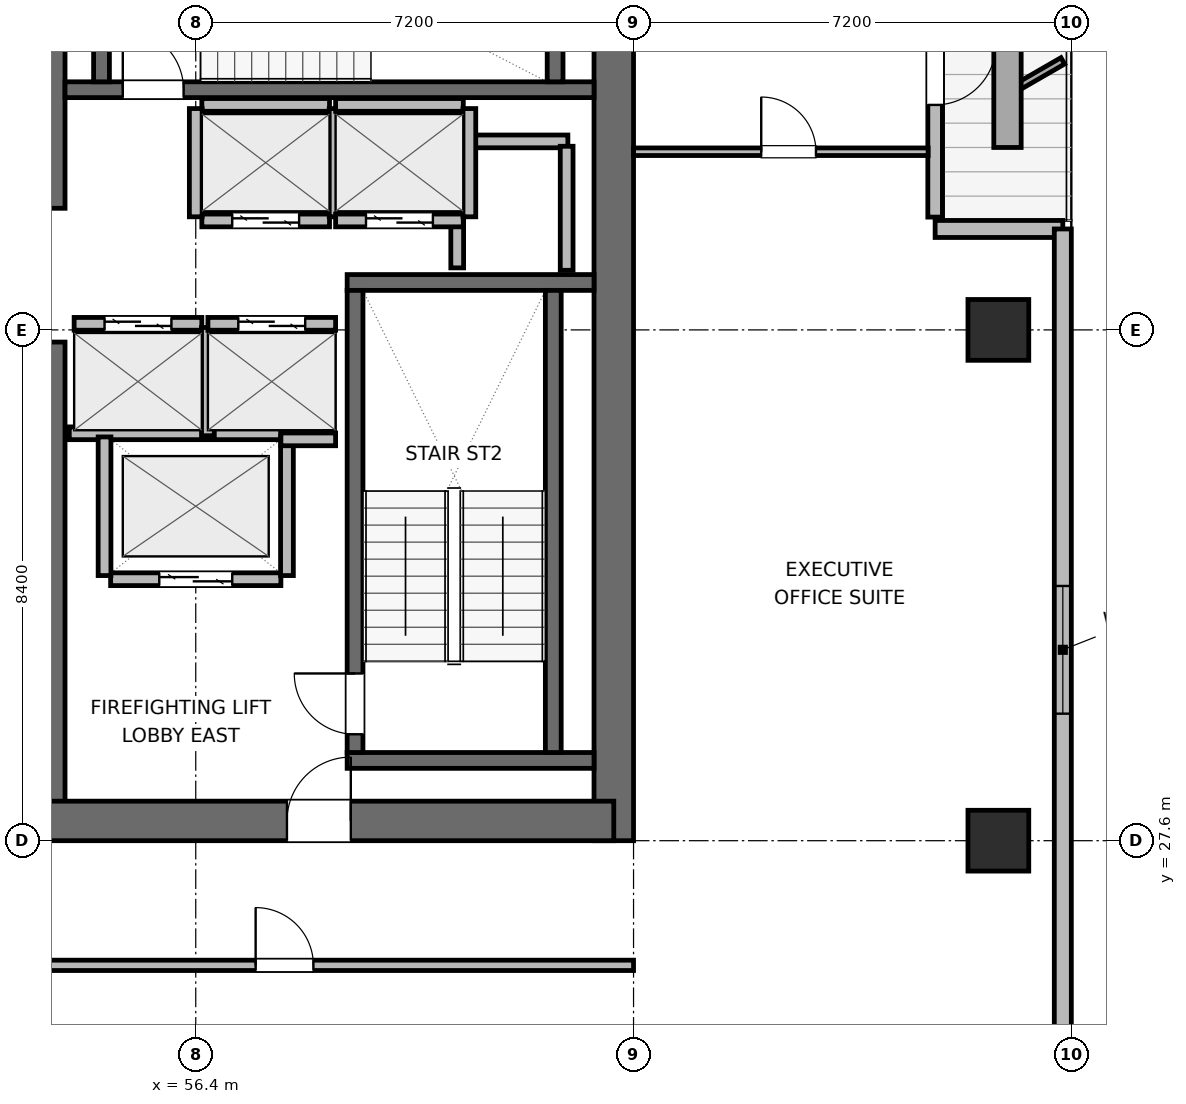
"""IFC4 building model, lengths in metres.
Left out: names, types, materials, properties, quantities, classifications, styles, units other than length and angle.
Written with IfcOpenShell. Run it as: python <this file> out.ifc"""

import sys

from ifc_helpers import new_model, si_unit, direction, frame, frame_2d, origin, origin_2d, place, context, subcontext, project, spatial, rectangle, extrude, element, fill, save


model = new_model("IFC4")
c1 = context("Model", 3, precision=1e-05, world=origin(), true_north=direction((0.0, 1.0)))
c2 = subcontext(c1, "Body", "Model", "MODEL_VIEW")
j1 = project(units=[si_unit("LENGTHUNIT", "METRE"), si_unit("PLANEANGLEUNIT", "RADIAN")], contexts=[c1])
p1 = place(None, origin())
s1 = spatial("IfcSite", under=j1, at=p1, CompositionType="ELEMENT")
p2 = place(p1, origin())
s2 = spatial("IfcBuilding", under=s1, at=p2, CompositionType="ELEMENT")
p3 = place(p2, frame((0.0, 0.0, 231.0)))
s3 = spatial("IfcBuildingStorey", under=s2, at=p3, CompositionType="ELEMENT", Elevation=231.0)
p4 = place(p3, frame((53.925, 27.925, 0.0), z_axis=(0.0, 0.0, 1.0), x_axis=(0.0, 1.0, 0.0)))
e1 = element("IfcWall", 1, at=p4, inside=s3, PredefinedType="SHEAR", context=c2, shape_type="SweptSolid", body=[
    extrude(rectangle(XDim=7.875, YDim=0.65, at=frame_2d((3.938, 0.0))), origin(), (0.0, 0.0, 1.0), 3.9),
])
p5 = place(p3, frame((53.925, 38.0, 0.0), z_axis=(0.0, 0.0, 1.0), x_axis=(0.0, 1.0, 0.0)))
e2 = element("IfcWall", 2, at=p5, inside=s3, PredefinedType="SHEAR", context=c2, shape_type="SweptSolid", body=[
    extrude(rectangle(XDim=6.075, YDim=0.65, at=frame_2d((3.038, 0.0))), origin(), (0.0, 0.0, 1.0), 3.9),
])
p6 = place(p3, frame((63.275, 27.6, 0.0), z_axis=(0.0, 0.0, 1.0), x_axis=(0.0, 1.0, 0.0)))
e3 = element("IfcWall", 3, at=p6, inside=s3, PredefinedType="SHEAR", context=c2, shape_type="SweptSolid", body=[
    extrude(rectangle(XDim=16.8, YDim=0.65, at=frame_2d((8.4, 0.0))), origin(), (0.0, 0.0, 1.0), 3.9),
])
p7 = place(p3, frame((53.925, 27.925, 0.0), z_axis=(0.0, 0.0, 1.0), x_axis=(1.0, 0.0, 0.0)))
e4 = element("IfcWall", 4, at=p7, inside=s3, PredefinedType="SHEAR", context=c2, shape_type="SweptSolid", body=[
    extrude(rectangle(XDim=9.35, YDim=0.65, at=frame_2d((4.675, 0.0))), origin(), (0.0, 0.0, 1.0), 3.9),
])
p8 = place(p7, frame((3.975, 0.0, 0.0)))
e5 = element("IfcOpeningElement", 5, at=p8, cuts=e4, PredefinedType="OPENING", context=c2, shape_type="SweptSolid", body=[
    extrude(rectangle(XDim=1.05, YDim=2.04, at=frame_2d((0.525, 1.02))), frame((0.0, 0.335, 0.0), z_axis=(0.0, -1.0, 0.0), x_axis=(1.0, 0.0, 0.0)), (0.0, 0.0, 1.0), 0.67),
])
for number, where, z_axis, x_axis in (
    (6, (58.89, 28.92, 0.0), (0.0, 0.0, 1.0), (1.0, 0.0, 0.0)),
    (7, (58.89, 36.78, 0.0), (0.0, 0.0, 1.0), (1.0, 0.0, 0.0)),
):
    element("IfcWall", number, at=place(p3, frame(where, z_axis=z_axis, x_axis=x_axis)), inside=s3, PredefinedType="SHEAR", context=c2, shape_type="SweptSolid", body=[
        extrude(rectangle(XDim=4.06, YDim=0.26, at=frame_2d((2.03, 0.0))), origin(), (0.0, 0.0, 1.0), 3.9),
    ])
p9 = place(p3, frame((59.02, 29.05, 0.0), z_axis=(0.0, 0.0, 1.0), x_axis=(0.0, 1.0, 0.0)))
e8 = element("IfcWall", 8, at=p9, inside=s3, PredefinedType="SHEAR", context=c2, shape_type="SweptSolid", body=[
    extrude(rectangle(XDim=7.6, YDim=0.26, at=frame_2d((3.8, 0.0))), origin(), (0.0, 0.0, 1.0), 3.9),
])
p10 = place(p9, frame((0.3, 0.0, 0.0)))
e9 = element("IfcOpeningElement", 9, at=p10, cuts=e8, PredefinedType="OPENING", context=c2, shape_type="SweptSolid", body=[
    extrude(rectangle(XDim=1.0, YDim=2.04, at=frame_2d((0.5, 1.02))), frame((0.0, 0.14, 0.0), z_axis=(0.0, -1.0, 0.0), x_axis=(1.0, 0.0, 0.0)), (0.0, 0.0, 1.0), 0.28),
])
p11 = place(p3, frame((62.28, 29.05, 0.0), z_axis=(0.0, 0.0, 1.0), x_axis=(0.0, 1.0, 0.0)))
e10 = element("IfcWall", 10, at=p11, inside=s3, PredefinedType="SHEAR", context=c2, shape_type="SweptSolid", body=[
    extrude(rectangle(XDim=7.6, YDim=0.26, at=frame_2d((3.8, 0.0))), origin(), (0.0, 0.0, 1.0), 3.9),
])
p12 = place(p3, frame((54.25, 39.95, 0.0), z_axis=(0.0, 0.0, 1.0), x_axis=(1.0, 0.0, 0.0)))
e11 = element("IfcWall", 11, at=p12, inside=s3, PredefinedType="SHEAR", context=c2, shape_type="SweptSolid", body=[
    extrude(rectangle(XDim=8.7, YDim=0.26, at=frame_2d((4.35, 0.0))), origin(), (0.0, 0.0, 1.0), 3.9),
])
p13 = place(p12, frame((0.95, 0.0, 0.0)))
e12 = element("IfcOpeningElement", 12, at=p13, cuts=e11, PredefinedType="OPENING", context=c2, shape_type="SweptSolid", body=[
    extrude(rectangle(XDim=1.0, YDim=2.04, at=frame_2d((0.5, 1.02))), frame((0.0, 0.14, 0.0), z_axis=(0.0, -1.0, 0.0), x_axis=(1.0, 0.0, 0.0)), (0.0, 0.0, 1.0), 0.28),
])
for number, where, z_axis, x_axis in (
    (13, (54.85, 40.08, 0.0), (0.0, 0.0, 1.0), (0.0, 1.0, 0.0)),
    (14, (62.31, 40.08, 0.0), (0.0, 0.0, 1.0), (0.0, 1.0, 0.0)),
):
    element("IfcWall", number, at=place(p3, frame(where, z_axis=z_axis, x_axis=x_axis)), inside=s3, PredefinedType="SHEAR", context=c2, shape_type="SweptSolid", body=[
        extrude(rectangle(XDim=2.94, YDim=0.26, at=frame_2d((1.47, 0.0))), origin(), (0.0, 0.0, 1.0), 3.9),
    ])
for number, where, z_axis, x_axis in (
    (15, (69.6, 27.6, 0.0), (0.0, 0.0, 1.0), (1.0, 0.0, 0.0)),
    (16, (69.6, 36.0, 0.0), (0.0, 0.0, 1.0), (1.0, 0.0, 0.0)),
):
    element("IfcColumn", number, at=place(p3, frame(where, z_axis=z_axis, x_axis=x_axis)), inside=s3, PredefinedType="COLUMN", context=c2, shape_type="SweptSolid", body=[
        extrude(rectangle(XDim=1.0, YDim=1.0, at=origin_2d()), origin(), (0.0, 0.0, 1.0), 3.9),
    ])
p14 = place(p3, frame((68.56, 42.545, 0.0), z_axis=(0.0, 0.0, 1.0), x_axis=(0.0, -1.0, 0.0)))
e17 = element("IfcWall", 17, at=p14, inside=s3, PredefinedType="SOLIDWALL", context=c2, shape_type="SweptSolid", body=[
    extrude(rectangle(XDim=4.69, YDim=0.24, at=frame_2d((2.345, 0.0))), origin(), (0.0, 0.0, 1.0), 3.248),
])
p15 = place(p14, frame((1.845, 0.0, 0.0)))
e18 = element("IfcOpeningElement", 18, at=p15, cuts=e17, PredefinedType="OPENING", context=c2, shape_type="SweptSolid", body=[
    extrude(rectangle(XDim=1.0, YDim=2.02, at=frame_2d((0.5, 1.01))), frame((0.0, 0.13, 0.0), z_axis=(0.0, -1.0, 0.0), x_axis=(1.0, 0.0, 0.0)), (0.0, 0.0, 1.0), 0.26),
])
p16 = place(p3, frame((68.56, 37.66, 0.0), z_axis=(0.0, 0.0, 1.0), x_axis=(1.0, 0.0, 0.0)))
e19 = element("IfcWall", 19, at=p16, inside=s3, PredefinedType="SOLIDWALL", context=c2, shape_type="SweptSolid", body=[
    extrude(rectangle(XDim=2.1, YDim=0.28, at=frame_2d((1.05, 0.0))), origin(), (0.0, 0.0, 1.0), 3.116),
])
p17 = place(p3, frame((70.66, 37.66, 0.0), z_axis=(0.0, 0.0, 1.0), x_axis=(0.0, -1.0, 0.0)))
e20 = element("IfcWall", 20, at=p17, inside=s3, PredefinedType="SOLIDWALL", context=c2, shape_type="SweptSolid", body=[
    extrude(rectangle(XDim=13.842, YDim=0.28, at=frame_2d((6.921, 0.0))), origin(), (0.0, 0.0, 1.0), 3.68),
])
p18 = place(p17, frame((5.871, 0.0, 0.85)))
e21 = element("IfcOpeningElement", 21, at=p18, cuts=e20, PredefinedType="OPENING", context=c2, shape_type="SweptSolid", body=[
    extrude(rectangle(XDim=2.1, YDim=1.05, at=frame_2d((1.05, 0.525))), frame((0.0, 0.15, 0.0), z_axis=(0.0, -1.0, 0.0), x_axis=(1.0, 0.0, 0.0)), (0.0, 0.0, 1.0), 0.3),
])
p19 = place(p3, frame((60.72, 39.1, 0.0), z_axis=(0.0, 0.0, 1.0), x_axis=(1.0, 0.0, 0.0)))
e22 = element("IfcWall", 22, at=p19, inside=s3, PredefinedType="PARTITIONING", context=c2, shape_type="SweptSolid", body=[
    extrude(rectangle(XDim=1.8, YDim=0.21, at=frame_2d((0.9, 0.0))), origin(), (0.0, 0.0, 1.0), 3.68),
])
p20 = place(p3, frame((60.7, 37.02, 0.0), z_axis=(0.0, 0.0, 1.0), x_axis=(0.0, 1.0, 0.0)))
e23 = element("IfcWall", 23, at=p20, inside=s3, PredefinedType="PARTITIONING", context=c2, shape_type="SweptSolid", body=[
    extrude(rectangle(XDim=1.96, YDim=0.21, at=frame_2d((0.98, 0.0))), origin(), (0.0, 0.0, 1.0), 3.68),
])
p21 = place(p3, frame((62.5, 36.98, 0.0), z_axis=(0.0, 0.0, 1.0), x_axis=(0.0, 1.0, 0.0)))
e24 = element("IfcWall", 24, at=p21, inside=s3, PredefinedType="PARTITIONING", context=c2, shape_type="SweptSolid", body=[
    extrude(rectangle(XDim=2.04, YDim=0.21, at=frame_2d((1.02, 0.0))), origin(), (0.0, 0.0, 1.0), 3.68),
])
p22 = place(p3, frame((55.0, 31.9, 0.0), z_axis=(0.0, 0.0, 1.0), x_axis=(1.0, 0.0, 0.0)))
e25 = element("IfcWall", 25, at=p22, inside=s3, PredefinedType="PARTITIONING", context=c2, shape_type="SweptSolid", body=[
    extrude(rectangle(XDim=2.8, YDim=0.21, at=frame_2d((1.4, 0.0))), origin(), (0.0, 0.0, 1.0), 3.68),
])
p23 = place(p22, frame((0.8, 0.0, 0.0)))
e26 = element("IfcOpeningElement", 26, at=p23, cuts=e25, PredefinedType="OPENING", context=c2, shape_type="SweptSolid", body=[
    extrude(rectangle(XDim=1.2, YDim=2.04, at=frame_2d((0.6, 1.02))), frame((0.0, 0.115, 0.0), z_axis=(0.0, -1.0, 0.0), x_axis=(1.0, 0.0, 0.0)), (0.0, 0.0, 1.0), 0.23),
])
p24 = place(p3, frame((54.32, 34.3, 0.0), z_axis=(0.0, 0.0, 1.0), x_axis=(1.0, 0.0, 0.0)))
e27 = element("IfcWall", 27, at=p24, inside=s3, PredefinedType="PARTITIONING", context=c2, shape_type="SweptSolid", body=[
    extrude(rectangle(XDim=3.48, YDim=0.21, at=frame_2d((1.74, 0.0))), origin(), (0.0, 0.0, 1.0), 3.68),
])
for number, where, z_axis, x_axis in (
    (28, (54.9, 31.96, 0.0), (0.0, 0.0, 1.0), (0.0, 1.0, 0.0)),
    (29, (57.9, 31.96, 0.0), (0.0, 0.0, 1.0), (0.0, 1.0, 0.0)),
):
    element("IfcWall", number, at=place(p3, frame(where, z_axis=z_axis, x_axis=x_axis)), inside=s3, PredefinedType="PARTITIONING", context=c2, shape_type="SweptSolid", body=[
        extrude(rectangle(XDim=2.28, YDim=0.21, at=frame_2d((1.14, 0.0))), origin(), (0.0, 0.0, 1.0), 3.68),
    ])
p25 = place(p3, frame((54.4, 36.1, 0.0), z_axis=(0.0, 0.0, 1.0), x_axis=(1.0, 0.0, 0.0)))
e30 = element("IfcWall", 30, at=p25, inside=s3, PredefinedType="PARTITIONING", context=c2, shape_type="SweptSolid", body=[
    extrude(rectangle(XDim=2.1, YDim=0.21, at=frame_2d((1.05, 0.0))), origin(), (0.0, 0.0, 1.0), 3.68),
])
p26 = place(p25, frame((0.5, 0.0, 0.0)))
e31 = element("IfcOpeningElement", 31, at=p26, cuts=e30, PredefinedType="OPENING", context=c2, shape_type="SweptSolid", body=[
    extrude(rectangle(XDim=1.1, YDim=2.04, at=frame_2d((0.55, 1.02))), frame((0.0, 0.115, 0.0), z_axis=(0.0, -1.0, 0.0), x_axis=(1.0, 0.0, 0.0)), (0.0, 0.0, 1.0), 0.23),
])
p27 = place(p3, frame((56.6, 34.26, 0.0), z_axis=(0.0, 0.0, 1.0), x_axis=(0.0, 1.0, 0.0)))
e32 = element("IfcWall", 32, at=p27, inside=s3, PredefinedType="PARTITIONING", context=c2, shape_type="SweptSolid", body=[
    extrude(rectangle(XDim=1.78, YDim=0.21, at=frame_2d((0.89, 0.0))), origin(), (0.0, 0.0, 1.0), 3.68),
])
p28 = place(p3, frame((56.6, 36.1, 0.0), z_axis=(0.0, 0.0, 1.0), x_axis=(1.0, 0.0, 0.0)))
e33 = element("IfcWall", 33, at=p28, inside=s3, PredefinedType="PARTITIONING", context=c2, shape_type="SweptSolid", body=[
    extrude(rectangle(XDim=2.1, YDim=0.21, at=frame_2d((1.05, 0.0))), origin(), (0.0, 0.0, 1.0), 3.68),
])
p29 = place(p28, frame((0.5, 0.0, 0.0)))
e34 = element("IfcOpeningElement", 34, at=p29, cuts=e33, PredefinedType="OPENING", context=c2, shape_type="SweptSolid", body=[
    extrude(rectangle(XDim=1.1, YDim=2.04, at=frame_2d((0.55, 1.02))), frame((0.0, 0.115, 0.0), z_axis=(0.0, -1.0, 0.0), x_axis=(1.0, 0.0, 0.0)), (0.0, 0.0, 1.0), 0.23),
])
p30 = place(p3, frame((57.8, 34.2, 0.0), z_axis=(0.0, 0.0, 1.0), x_axis=(1.0, 0.0, 0.0)))
e35 = element("IfcWall", 35, at=p30, inside=s3, PredefinedType="PARTITIONING", context=c2, shape_type="SweptSolid", body=[
    extrude(rectangle(XDim=0.9, YDim=0.21, at=frame_2d((0.45, 0.0))), origin(), (0.0, 0.0, 1.0), 3.68),
])
p31 = place(p3, frame((56.5, 37.8, 0.0), z_axis=(0.0, 0.0, 1.0), x_axis=(1.0, 0.0, 0.0)))
e36 = element("IfcWall", 36, at=p31, inside=s3, PredefinedType="PARTITIONING", context=c2, shape_type="SweptSolid", body=[
    extrude(rectangle(XDim=2.1, YDim=0.21, at=frame_2d((1.05, 0.0))), origin(), (0.0, 0.0, 1.0), 3.68),
])
p32 = place(p31, frame((0.5, 0.0, 0.0)))
e37 = element("IfcOpeningElement", 37, at=p32, cuts=e36, PredefinedType="OPENING", context=c2, shape_type="SweptSolid", body=[
    extrude(rectangle(XDim=1.1, YDim=2.04, at=frame_2d((0.55, 1.02))), frame((0.0, 0.115, 0.0), z_axis=(0.0, -1.0, 0.0), x_axis=(1.0, 0.0, 0.0)), (0.0, 0.0, 1.0), 0.23),
])
p33 = place(p3, frame((56.5, 39.7, 0.0), z_axis=(0.0, 0.0, 1.0), x_axis=(1.0, 0.0, 0.0)))
e38 = element("IfcWall", 38, at=p33, inside=s3, PredefinedType="PARTITIONING", context=c2, shape_type="SweptSolid", body=[
    extrude(rectangle(XDim=2.1, YDim=0.21, at=frame_2d((1.05, 0.0))), origin(), (0.0, 0.0, 1.0), 3.68),
])
for number, where, z_axis, x_axis in (
    (39, (56.4, 37.86, 0.0), (0.0, 0.0, 1.0), (0.0, 1.0, 0.0)),
    (40, (58.7, 37.86, 0.0), (0.0, 0.0, 1.0), (0.0, 1.0, 0.0)),
):
    element("IfcWall", number, at=place(p3, frame(where, z_axis=z_axis, x_axis=x_axis)), inside=s3, PredefinedType="PARTITIONING", context=c2, shape_type="SweptSolid", body=[
        extrude(rectangle(XDim=1.78, YDim=0.21, at=frame_2d((0.89, 0.0))), origin(), (0.0, 0.0, 1.0), 3.68),
    ])
p34 = place(p3, frame((58.7, 37.8, 0.0), z_axis=(0.0, 0.0, 1.0), x_axis=(1.0, 0.0, 0.0)))
e41 = element("IfcWall", 41, at=p34, inside=s3, PredefinedType="PARTITIONING", context=c2, shape_type="SweptSolid", body=[
    extrude(rectangle(XDim=2.1, YDim=0.21, at=frame_2d((1.05, 0.0))), origin(), (0.0, 0.0, 1.0), 3.68),
])
p35 = place(p34, frame((0.5, 0.0, 0.0)))
e42 = element("IfcOpeningElement", 42, at=p35, cuts=e41, PredefinedType="OPENING", context=c2, shape_type="SweptSolid", body=[
    extrude(rectangle(XDim=1.1, YDim=2.04, at=frame_2d((0.55, 1.02))), frame((0.0, 0.115, 0.0), z_axis=(0.0, -1.0, 0.0), x_axis=(1.0, 0.0, 0.0)), (0.0, 0.0, 1.0), 0.23),
])
p36 = place(p3, frame((58.7, 39.7, 0.0), z_axis=(0.0, 0.0, 1.0), x_axis=(1.0, 0.0, 0.0)))
e43 = element("IfcWall", 43, at=p36, inside=s3, PredefinedType="PARTITIONING", context=c2, shape_type="SweptSolid", body=[
    extrude(rectangle(XDim=2.1, YDim=0.21, at=frame_2d((1.05, 0.0))), origin(), (0.0, 0.0, 1.0), 3.68),
])
p37 = place(p3, frame((60.9, 37.86, 0.0), z_axis=(0.0, 0.0, 1.0), x_axis=(0.0, 1.0, 0.0)))
e44 = element("IfcWall", 44, at=p37, inside=s3, PredefinedType="PARTITIONING", context=c2, shape_type="SweptSolid", body=[
    extrude(rectangle(XDim=1.78, YDim=0.21, at=frame_2d((0.89, 0.0))), origin(), (0.0, 0.0, 1.0), 3.68),
])
p38 = place(p3, frame((30.35, 25.55, 0.0), z_axis=(0.0, 0.0, 1.0), x_axis=(1.0, 0.0, 0.0)))
e45 = element("IfcWall", 45, at=p38, inside=s3, PredefinedType="PARTITIONING", context=c2, shape_type="SweptSolid", body=[
    extrude(rectangle(XDim=33.25, YDim=0.17, at=frame_2d((16.625, 0.0))), origin(), (0.0, 0.0, 1.0), 3.68),
])
p39 = place(p38, frame((5.265, 0.0, 0.0)))
e46 = element("IfcOpeningElement", 46, at=p39, cuts=e45, PredefinedType="OPENING", context=c2, shape_type="SweptSolid", body=[
    extrude(rectangle(XDim=0.95, YDim=2.04, at=frame_2d((0.475, 1.02))), frame((0.0, 0.095, 0.0), z_axis=(0.0, -1.0, 0.0), x_axis=(1.0, 0.0, 0.0)), (0.0, 0.0, 1.0), 0.19),
])
p40 = place(p38, frame((16.15, 0.0, 0.0)))
e47 = element("IfcOpeningElement", 47, at=p40, cuts=e45, PredefinedType="OPENING", context=c2, shape_type="SweptSolid", body=[
    extrude(rectangle(XDim=0.95, YDim=2.04, at=frame_2d((0.475, 1.02))), frame((0.0, 0.095, 0.0), z_axis=(0.0, -1.0, 0.0), x_axis=(1.0, 0.0, 0.0)), (0.0, 0.0, 1.0), 0.19),
])
p41 = place(p38, frame((27.035, 0.0, 0.0)))
e48 = element("IfcOpeningElement", 48, at=p41, cuts=e45, PredefinedType="OPENING", context=c2, shape_type="SweptSolid", body=[
    extrude(rectangle(XDim=0.95, YDim=2.04, at=frame_2d((0.475, 1.02))), frame((0.0, 0.095, 0.0), z_axis=(0.0, -1.0, 0.0), x_axis=(1.0, 0.0, 0.0)), (0.0, 0.0, 1.0), 0.19),
])
p42 = place(p3, frame((63.6, 38.93, 0.0), z_axis=(0.0, 0.0, 1.0), x_axis=(1.0, 0.0, 0.0)))
e49 = element("IfcWall", 49, at=p42, inside=s3, PredefinedType="PARTITIONING", context=c2, shape_type="SweptSolid", body=[
    extrude(rectangle(XDim=4.845, YDim=0.125, at=frame_2d((2.422, 0.0))), origin(), (0.0, 0.0, 1.0), 3.68),
])
p43 = place(p42, frame((2.1, 0.0, 0.0)))
e50 = element("IfcOpeningElement", 50, at=p43, cuts=e49, PredefinedType="OPENING", context=c2, shape_type="SweptSolid", body=[
    extrude(rectangle(XDim=0.9, YDim=2.02, at=frame_2d((0.45, 1.01))), frame((0.0, 0.073, 0.0), z_axis=(0.0, -1.0, 0.0), x_axis=(1.0, 0.0, 0.0)), (0.0, 0.0, 1.0), 0.145),
])
p44 = place(p15, origin())
e51 = element("IfcDoor", 51, at=p44, inside=s3, OperationType="SINGLE_SWING_LEFT", PredefinedType="DOOR", context=c2, shape_type="SweptSolid", body=[
    extrude(rectangle(XDim=1.0, YDim=2.02, at=frame_2d((0.5, 1.01))), frame((0.0, 0.025, 0.0), z_axis=(0.0, -1.0, 0.0), x_axis=(1.0, 0.0, 0.0)), (0.0, 0.0, 1.0), 0.05),
])
fill(e18, e51)
p45 = place(p18, origin())
e52 = element("IfcWindow", 52, at=p45, inside=s3, PartitioningType="SINGLE_PANEL", PredefinedType="WINDOW", context=c2, shape_type="SweptSolid", body=[
    extrude(rectangle(XDim=2.1, YDim=1.05, at=frame_2d((1.05, 0.525))), frame((0.0, 0.03, 0.0), z_axis=(0.0, -1.0, 0.0), x_axis=(1.0, 0.0, 0.0)), (0.0, 0.0, 1.0), 0.06),
])
fill(e21, e52)
p46 = place(p10, origin())
e53 = element("IfcDoor", 53, at=p46, inside=s3, OperationType="SINGLE_SWING_RIGHT", PredefinedType="DOOR", context=c2, shape_type="SweptSolid", body=[
    extrude(rectangle(XDim=1.0, YDim=2.04, at=frame_2d((0.5, 1.02))), frame((0.0, 0.025, 0.0), z_axis=(0.0, -1.0, 0.0), x_axis=(1.0, 0.0, 0.0)), (0.0, 0.0, 1.0), 0.05),
])
fill(e9, e53)
p47 = place(p13, origin())
e54 = element("IfcDoor", 54, at=p47, inside=s3, OperationType="SINGLE_SWING_LEFT", PredefinedType="DOOR", context=c2, shape_type="SweptSolid", body=[
    extrude(rectangle(XDim=1.0, YDim=2.04, at=frame_2d((0.5, 1.02))), frame((0.0, 0.025, 0.0), z_axis=(0.0, -1.0, 0.0), x_axis=(1.0, 0.0, 0.0)), (0.0, 0.0, 1.0), 0.05),
])
fill(e12, e54)
p48 = place(p23, origin())
e55 = element("IfcDoor", 55, at=p48, inside=s3, OperationType="DOUBLE_DOOR_SLIDING", PredefinedType="DOOR", context=c2, shape_type="SweptSolid", body=[
    extrude(rectangle(XDim=1.2, YDim=2.04, at=frame_2d((0.6, 1.02))), frame((0.0, 0.025, 0.0), z_axis=(0.0, -1.0, 0.0), x_axis=(1.0, 0.0, 0.0)), (0.0, 0.0, 1.0), 0.05),
])
fill(e26, e55)
p49 = place(p26, origin())
e56 = element("IfcDoor", 56, at=p49, inside=s3, OperationType="DOUBLE_DOOR_SLIDING", PredefinedType="DOOR", context=c2, shape_type="SweptSolid", body=[
    extrude(rectangle(XDim=1.1, YDim=2.04, at=frame_2d((0.55, 1.02))), frame((0.0, 0.025, 0.0), z_axis=(0.0, -1.0, 0.0), x_axis=(1.0, 0.0, 0.0)), (0.0, 0.0, 1.0), 0.05),
])
fill(e31, e56)
p50 = place(p29, origin())
e57 = element("IfcDoor", 57, at=p50, inside=s3, OperationType="DOUBLE_DOOR_SLIDING", PredefinedType="DOOR", context=c2, shape_type="SweptSolid", body=[
    extrude(rectangle(XDim=1.1, YDim=2.04, at=frame_2d((0.55, 1.02))), frame((0.0, 0.025, 0.0), z_axis=(0.0, -1.0, 0.0), x_axis=(1.0, 0.0, 0.0)), (0.0, 0.0, 1.0), 0.05),
])
fill(e34, e57)
p51 = place(p32, origin())
e58 = element("IfcDoor", 58, at=p51, inside=s3, OperationType="DOUBLE_DOOR_SLIDING", PredefinedType="DOOR", context=c2, shape_type="SweptSolid", body=[
    extrude(rectangle(XDim=1.1, YDim=2.04, at=frame_2d((0.55, 1.02))), frame((0.0, 0.025, 0.0), z_axis=(0.0, -1.0, 0.0), x_axis=(1.0, 0.0, 0.0)), (0.0, 0.0, 1.0), 0.05),
])
fill(e37, e58)
p52 = place(p35, origin())
e59 = element("IfcDoor", 59, at=p52, inside=s3, OperationType="DOUBLE_DOOR_SLIDING", PredefinedType="DOOR", context=c2, shape_type="SweptSolid", body=[
    extrude(rectangle(XDim=1.1, YDim=2.04, at=frame_2d((0.55, 1.02))), frame((0.0, 0.025, 0.0), z_axis=(0.0, -1.0, 0.0), x_axis=(1.0, 0.0, 0.0)), (0.0, 0.0, 1.0), 0.05),
])
fill(e42, e59)
p53 = place(p8, origin())
e60 = element("IfcDoor", 60, at=p53, inside=s3, OperationType="SINGLE_SWING_RIGHT", PredefinedType="DOOR", context=c2, shape_type="SweptSolid", body=[
    extrude(rectangle(XDim=1.05, YDim=2.04, at=frame_2d((0.525, 1.02))), frame((0.0, 0.025, 0.0), z_axis=(0.0, -1.0, 0.0), x_axis=(1.0, 0.0, 0.0)), (0.0, 0.0, 1.0), 0.05),
])
fill(e5, e60)
p54 = place(p41, origin())
e61 = element("IfcDoor", 61, at=p54, inside=s3, OperationType="SINGLE_SWING_LEFT", PredefinedType="DOOR", context=c2, shape_type="SweptSolid", body=[
    extrude(rectangle(XDim=0.95, YDim=2.04, at=frame_2d((0.475, 1.02))), frame((0.0, 0.025, 0.0), z_axis=(0.0, -1.0, 0.0), x_axis=(1.0, 0.0, 0.0)), (0.0, 0.0, 1.0), 0.05),
])
fill(e48, e61)
p55 = place(p43, origin())
e62 = element("IfcDoor", 62, at=p55, inside=s3, OperationType="SINGLE_SWING_LEFT", PredefinedType="DOOR", context=c2, shape_type="SweptSolid", body=[
    extrude(rectangle(XDim=0.9, YDim=2.02, at=frame_2d((0.45, 1.01))), frame((0.0, 0.025, 0.0), z_axis=(0.0, -1.0, 0.0), x_axis=(1.0, 0.0, 0.0)), (0.0, 0.0, 1.0), 0.05),
])
fill(e50, e62)
save(model, sys.argv[1])
